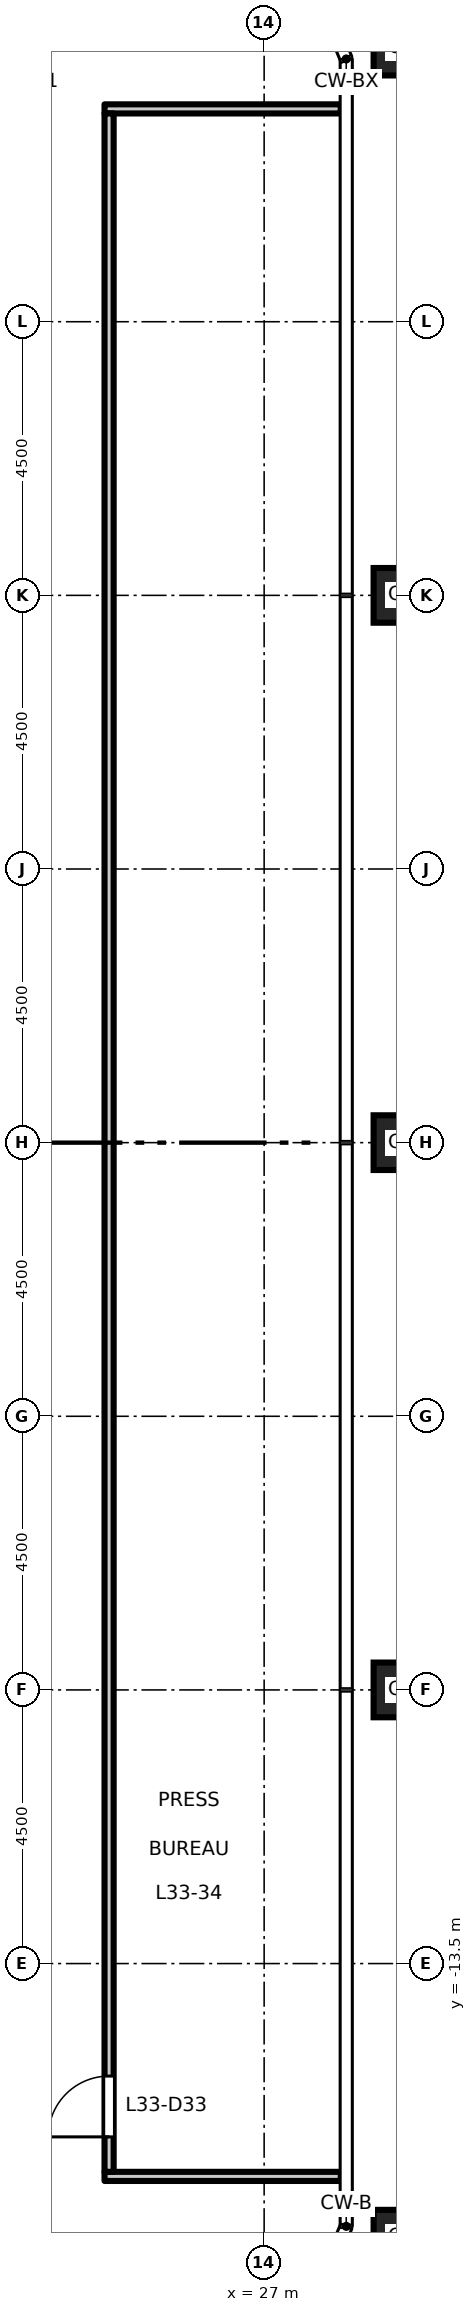
"""IFC4 building model, lengths in metres.
Left out: names, types, materials, properties, quantities, classifications, styles, units other than length and angle.
Written with IfcOpenShell. Run it as: python <this file> out.ifc"""

import sys

from ifc_helpers import new_model, si_unit, direction, frame, frame_2d, origin, origin_2d, place, context, subcontext, project, spatial, rectangle, hollow_rectangle, extrude, element, fill, save


model = new_model("IFC4")
c1 = context("Model", 3, precision=1e-05, world=origin(), true_north=direction((0.0, 1.0)))
c2 = subcontext(c1, "Body", "Model", "MODEL_VIEW")
j1 = project(units=[si_unit("LENGTHUNIT", "METRE"), si_unit("PLANEANGLEUNIT", "RADIAN")], contexts=[c1])
p1 = place(None, origin())
s1 = spatial("IfcSite", under=j1, at=p1, CompositionType="ELEMENT")
p2 = place(p1, origin())
s2 = spatial("IfcBuilding", under=s1, at=p2, CompositionType="ELEMENT")
p3 = place(p2, frame((0.0, 0.0, 154.2)))
s3 = spatial("IfcBuildingStorey", under=s2, at=p3, CompositionType="ELEMENT", Elevation=154.2)
for number, where, z_axis, x_axis in (
    (1, (29.25, -18.0, 0.0), (0.0, 0.0, 1.0), (1.0, 0.0, 0.0)),
    (2, (29.25, -9.0, 0.0), (0.0, 0.0, 1.0), (1.0, 0.0, 0.0)),
    (3, (29.25, 0.0, 0.0), (0.0, 0.0, 1.0), (1.0, 0.0, 0.0)),
    (4, (29.25, 9.0, 0.0), (0.0, 0.0, 1.0), (1.0, 0.0, 0.0)),
    (5, (29.25, 18.0, 0.0), (0.0, 0.0, 1.0), (1.0, 0.0, 0.0)),
):
    element("IfcColumn", number, at=place(p3, frame(where, z_axis=z_axis, x_axis=x_axis)), inside=s3, PredefinedType="COLUMN", context=c2, shape_type="SweptSolid", body=[
        extrude(hollow_rectangle(XDim=0.9, YDim=0.9, WallThickness=0.05, at=origin_2d()), origin(), (0.0, 0.0, 1.0), 4.5),
    ])
for number, where, z_axis, x_axis in (
    (6, (24.375, -17.0, 0.0), (0.0, 0.0, 1.0), (1.0, 0.0, 0.0)),
    (7, (24.375, 17.0, 0.0), (0.0, 0.0, 1.0), (1.0, 0.0, 0.0)),
):
    element("IfcWall", number, at=place(p3, frame(where, z_axis=z_axis, x_axis=x_axis)), inside=s3, PredefinedType="PARTITIONING", context=c2, shape_type="SweptSolid", body=[
        extrude(rectangle(XDim=3.885, YDim=0.15, at=frame_2d((1.942, 0.0))), origin(), (0.0, 0.0, 1.0), 4.35),
    ])
p4 = place(p3, frame((24.45, -16.925, 0.0), z_axis=(0.0, 0.0, 1.0), x_axis=(0.0, 1.0, 0.0)))
e8 = element("IfcWall", 8, at=p4, inside=s3, PredefinedType="PARTITIONING", context=c2, shape_type="SweptSolid", body=[
    extrude(rectangle(XDim=33.85, YDim=0.15, at=frame_2d((16.925, 0.0))), origin(), (0.0, 0.0, 1.0), 4.35),
])
p5 = place(p4, frame((0.575, 0.0, 0.0)))
e9 = element("IfcOpeningElement", 9, at=p5, cuts=e8, PredefinedType="OPENING", context=c2, shape_type="SweptSolid", body=[
    extrude(rectangle(XDim=1.0, YDim=2.1, at=frame_2d((0.5, 1.05))), frame((0.0, 0.085, 0.0), z_axis=(0.0, -1.0, 0.0), x_axis=(1.0, 0.0, 0.0)), (0.0, 0.0, 1.0), 0.17),
])
p6 = place(p5, origin())
e10 = element("IfcDoor", 10, at=p6, inside=s3, OperationType="SINGLE_SWING_LEFT", PredefinedType="DOOR", context=c2, shape_type="SweptSolid", body=[
    extrude(rectangle(XDim=1.0, YDim=2.1, at=frame_2d((0.5, 1.05))), frame((0.0, 0.025, 0.0), z_axis=(0.0, -1.0, 0.0), x_axis=(1.0, 0.0, 0.0)), (0.0, 0.0, 1.0), 0.05),
])
fill(e9, e10)
save(model, sys.argv[1])
